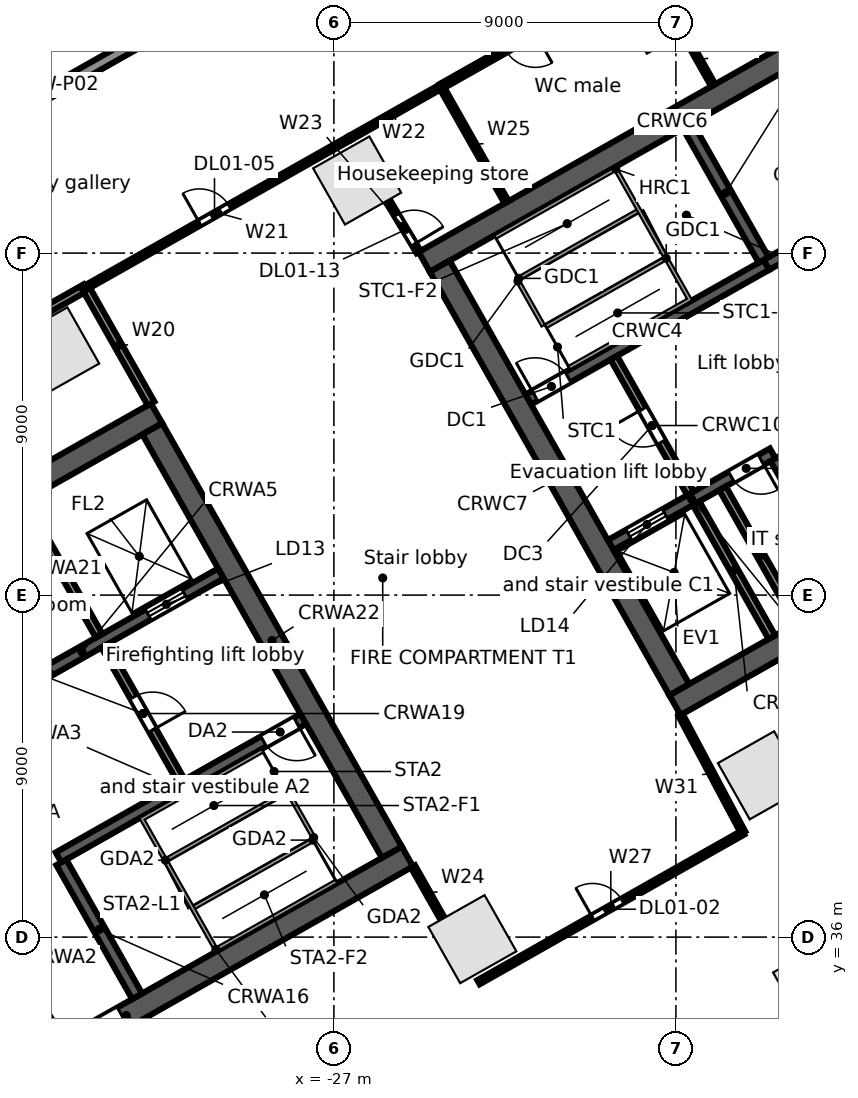
"""IFC4 building model, lengths in metres.
Left out: names, types, materials, properties, quantities, classifications, styles, units other than length and angle.
Written with IfcOpenShell. Run it as: python <this file> out.ifc"""

import sys

from ifc_helpers import new_model, si_unit, direction, frame, frame_2d, origin, origin_2d, place, context, subcontext, project, spatial, rectangle, extrude, element, fill, save


model = new_model("IFC4")
c1 = context("Model", 3, precision=1e-05, world=origin(), true_north=direction((0.0, 1.0)))
c2 = subcontext(c1, "Body", "Model", "MODEL_VIEW")
j1 = project(units=[si_unit("LENGTHUNIT", "METRE"), si_unit("PLANEANGLEUNIT", "RADIAN")], contexts=[c1])
p1 = place(None, origin())
s1 = spatial("IfcSite", under=j1, at=p1, CompositionType="ELEMENT")
p2 = place(p1, origin())
s2 = spatial("IfcBuilding", under=s1, at=p2, CompositionType="ELEMENT")
p3 = place(p2, frame((0.0, 0.0, 6.5)))
s3 = spatial("IfcBuildingStorey", under=s2, at=p3, CompositionType="ELEMENT", Elevation=6.5)
for number, where, z_axis, x_axis in (
    (1, (-18.441, 60.406, 0.0), (0.0, 0.0, 1.0), (-0.87, -0.492, 0.0)),
    (2, (-26.388, 55.91, 0.0), (0.0, 0.0, 1.0), (-0.87, -0.492, 0.0)),
    (3, (-34.334, 51.414, 0.0), (0.0, 0.0, 1.0), (-0.87, -0.492, 0.0)),
    (4, (-23.356, 35.946, 0.0), (0.0, 0.0, 1.0), (0.87, 0.492, 0.0)),
    (5, (-15.736, 40.257, 0.0), (0.0, 0.0, 1.0), (0.87, 0.492, 0.0)),
):
    element("IfcColumn", number, at=place(p3, frame(where, z_axis=z_axis, x_axis=x_axis)), inside=s3, PredefinedType="COLUMN", context=c2, shape_type="SweptSolid", body=[
        extrude(rectangle(XDim=1.7, YDim=1.7, at=origin_2d()), origin(), (0.0, 0.0, 1.0), 5.0),
    ])
p4 = place(p3, frame((-14.761, 34.88, 0.0), z_axis=(0.0, 0.0, 1.0), x_axis=(0.87035569594, 0.492423560103, 0.0)))
e6 = element("IfcColumn", 6, at=p4, inside=s3, PredefinedType="COLUMN", context=c2, shape_type="SweptSolid", body=[
    extrude(rectangle(XDim=1.0, YDim=1.0, at=origin_2d()), origin(), (0.0, 0.0, 1.0), 5.0),
])
p5 = place(p3, frame((-63.707, 41.701, 0.0), z_axis=(0.0, 0.0, 1.0), x_axis=(0.870355510268, 0.492423888277, 0.0)))
e7 = element("IfcWall", 7, at=p5, inside=s3, PredefinedType="STANDARD", context=c2, shape_type="SweptSolid", body=[
    extrude(rectangle(XDim=67.903, YDim=0.3, at=frame_2d((33.952, 0.0))), origin(), (0.0, 0.0, 1.0), 4.65),
])
p6 = place(p3, frame((-39.862, 29.749, 0.0), z_axis=(0.0, 0.0, 1.0), x_axis=(0.870350116061, 0.492433422375, 0.0)))
e8 = element("IfcWall", 8, at=p6, inside=s3, PredefinedType="SOLIDWALL", context=c2, shape_type="SweptSolid", body=[
    extrude(rectangle(XDim=17.0, YDim=0.6, at=frame_2d((8.5, 0.0))), origin(), (0.0, 0.0, 1.0), 4.65),
])
p7 = place(p6, frame((7.2, 0.0, 0.0)))
e9 = element("IfcOpeningElement", 9, at=p7, cuts=e8, PredefinedType="OPENING", context=c2, shape_type="SweptSolid", body=[
    extrude(rectangle(XDim=1.2, YDim=2.1, at=frame_2d((0.6, 1.05))), frame((0.0, 0.31, 0.0), z_axis=(0.0, -1.0, 0.0), x_axis=(1.0, 0.0, 0.0)), (0.0, 0.0, 1.0), 0.62),
])
p8 = place(p3, frame((-34.245, 38.097, 0.0), z_axis=(0.0, 0.0, 1.0), x_axis=(0.870364910201, 0.492407273597, 0.0)))
e10 = element("IfcWall", 10, at=p8, inside=s3, PredefinedType="SOLIDWALL", context=c2, shape_type="SweptSolid", body=[
    extrude(rectangle(XDim=7.4, YDim=0.3, at=frame_2d((3.7, 0.0))), origin(), (0.0, 0.0, 1.0), 4.65),
])
p9 = place(p8, frame((6.2, 0.0, 0.0)))
e11 = element("IfcOpeningElement", 11, at=p9, cuts=e10, PredefinedType="OPENING", context=c2, shape_type="SweptSolid", body=[
    extrude(rectangle(XDim=1.0, YDim=2.1, at=frame_2d((0.5, 1.05))), frame((0.0, 0.16, 0.0), z_axis=(0.0, -1.0, 0.0), x_axis=(1.0, 0.0, 0.0)), (0.0, 0.0, 1.0), 0.32),
])
p10 = place(p3, frame((-37.282, 41.435, 0.0), z_axis=(0.0, 0.0, 1.0), x_axis=(0.870356516133, 0.492422110414, 0.0)))
e12 = element("IfcWall", 12, at=p10, inside=s3, PredefinedType="SOLIDWALL", context=c2, shape_type="SweptSolid", body=[
    extrude(rectangle(XDim=8.4, YDim=0.3, at=frame_2d((4.2, 0.0))), origin(), (0.0, 0.0, 1.0), 4.65),
])
p11 = place(p10, frame((6.2, 0.0, 0.0)))
e13 = element("IfcOpeningElement", 13, at=p11, cuts=e12, PredefinedType="OPENING", context=c2, shape_type="SweptSolid", body=[
    extrude(rectangle(XDim=1.1, YDim=2.1, at=frame_2d((0.55, 1.05))), frame((0.0, 0.16, 0.0), z_axis=(0.0, -1.0, 0.0), x_axis=(1.0, 0.0, 0.0)), (0.0, 0.0, 1.0), 0.32),
])
p12 = place(p10, frame((2.35, 0.0, 0.0)))
e14 = element("IfcOpeningElement", 14, at=p12, cuts=e12, PredefinedType="OPENING", context=c2, shape_type="SweptSolid", body=[
    extrude(rectangle(XDim=0.9, YDim=2.1, at=frame_2d((0.45, 1.05))), frame((0.0, 0.16, 0.0), z_axis=(0.0, -1.0, 0.0), x_axis=(1.0, 0.0, 0.0)), (0.0, 0.0, 1.0), 0.32),
])
p13 = place(p3, frame((-46.461, 41.412, 0.0), z_axis=(0.0, 0.0, 1.0), x_axis=(0.870350116061, 0.492433422375, 0.0)))
e15 = element("IfcWall", 15, at=p13, inside=s3, PredefinedType="SOLIDWALL", context=c2, shape_type="SweptSolid", body=[
    extrude(rectangle(XDim=17.0, YDim=0.6, at=frame_2d((8.5, 0.0))), origin(), (0.0, 0.0, 1.0), 4.65),
])
p14 = place(p3, frame((-36.26, 36.785, 0.0), z_axis=(0.0, 0.0, 1.0), x_axis=(0.492440575896, -0.870346068648, 0.0)))
e16 = element("IfcWall", 16, at=p14, inside=s3, PredefinedType="SOLIDWALL", context=c2, shape_type="SweptSolid", body=[
    extrude(rectangle(XDim=4.05, YDim=0.3, at=frame_2d((2.025, 0.0))), origin(), (0.0, 0.0, 1.0), 4.65),
])
p15 = place(p3, frame((-34.171, 37.967, 0.0), z_axis=(0.0, 0.0, 1.0), x_axis=(0.492394910396, -0.870371904542, 0.0)))
e17 = element("IfcWall", 17, at=p15, inside=s3, PredefinedType="SOLIDWALL", context=c2, shape_type="SweptSolid", body=[
    extrude(rectangle(XDim=4.05, YDim=0.3, at=frame_2d((2.025, 0.0))), origin(), (0.0, 0.0, 1.0), 4.65),
])
p16 = place(p3, frame((-33.031, 43.667, 0.0), z_axis=(0.0, 0.0, 1.0), x_axis=(0.492408451753, -0.87036424366, 0.0)))
e18 = element("IfcWall", 18, at=p16, inside=s3, PredefinedType="PARTITIONING", context=c2, shape_type="SweptSolid", body=[
    extrude(rectangle(XDim=4.1, YDim=0.2, at=frame_2d((2.05, 0.0))), origin(), (0.0, 0.0, 1.0), 4.65),
])
p17 = place(p16, frame((1.55, 0.0, 0.0)))
e19 = element("IfcOpeningElement", 19, at=p17, cuts=e18, PredefinedType="OPENING", context=c2, shape_type="SweptSolid", body=[
    extrude(rectangle(XDim=1.0, YDim=2.1, at=frame_2d((0.5, 1.05))), frame((0.0, 0.11, 0.0), z_axis=(0.0, -1.0, 0.0), x_axis=(1.0, 0.0, 0.0)), (0.0, 0.0, 1.0), 0.22),
])
p18 = place(p3, frame((-35.173, 47.454, 0.0), z_axis=(0.0, 0.0, 1.0), x_axis=(0.492440575896, -0.870346068648, 0.0)))
e20 = element("IfcWall", 20, at=p18, inside=s3, PredefinedType="SOLIDWALL", context=c2, shape_type="SweptSolid", body=[
    extrude(rectangle(XDim=4.05, YDim=0.2, at=frame_2d((2.025, 0.0))), origin(), (0.0, 0.0, 1.0), 4.65),
])
p19 = place(p3, frame((-31.778, 49.374, 0.0), z_axis=(0.0, 0.0, 1.0), x_axis=(0.492433046652, -0.870350328641, 0.0)))
e21 = element("IfcWall", 21, at=p19, inside=s3, PredefinedType="SOLIDWALL", context=c2, shape_type="SweptSolid", body=[
    extrude(rectangle(XDim=12.8, YDim=0.6, at=frame_2d((6.4, 0.0))), origin(), (0.0, 0.0, 1.0), 4.65),
])
p20 = place(p3, frame((-18.024, 42.104, 0.0), z_axis=(0.0, 0.0, 1.0), x_axis=(0.870360574057, 0.492414937962, 0.0)))
e22 = element("IfcWall", 22, at=p20, inside=s3, PredefinedType="SOLIDWALL", context=c2, shape_type="SweptSolid", body=[
    extrude(rectangle(XDim=15.0, YDim=0.6, at=frame_2d((7.5, 0.0))), origin(), (0.0, 0.0, 1.0), 4.65),
])
p21 = place(p20, frame((6.1, 0.0, 0.0)))
e23 = element("IfcOpeningElement", 23, at=p21, cuts=e22, PredefinedType="OPENING", context=c2, shape_type="SweptSolid", body=[
    extrude(rectangle(XDim=1.2, YDim=2.1, at=frame_2d((0.6, 1.05))), frame((0.0, 0.31, 0.0), z_axis=(0.0, -1.0, 0.0), x_axis=(1.0, 0.0, 0.0)), (0.0, 0.0, 1.0), 0.62),
])
p22 = place(p3, frame((-19.718, 46.316, 0.0), z_axis=(0.0, 0.0, 1.0), x_axis=(0.870353963862, 0.492426621528, 0.0)))
e24 = element("IfcWall", 24, at=p22, inside=s3, PredefinedType="SOLIDWALL", context=c2, shape_type="SweptSolid", body=[
    extrude(rectangle(XDim=4.9, YDim=0.3, at=frame_2d((2.45, 0.0))), origin(), (0.0, 0.0, 1.0), 4.65),
])
p23 = place(p22, frame((0.55, 0.0, 0.0)))
e25 = element("IfcOpeningElement", 25, at=p23, cuts=e24, PredefinedType="OPENING", context=c2, shape_type="SweptSolid", body=[
    extrude(rectangle(XDim=1.1, YDim=2.1, at=frame_2d((0.55, 1.05))), frame((0.0, 0.16, 0.0), z_axis=(0.0, -1.0, 0.0), x_axis=(1.0, 0.0, 0.0)), (0.0, 0.0, 1.0), 0.32),
])
p24 = place(p22, frame((3.65, 0.0, 0.0)))
e26 = element("IfcOpeningElement", 26, at=p24, cuts=e24, PredefinedType="OPENING", context=c2, shape_type="SweptSolid", body=[
    extrude(rectangle(XDim=0.9, YDim=2.1, at=frame_2d((0.45, 1.05))), frame((0.0, 0.16, 0.0), z_axis=(0.0, -1.0, 0.0), x_axis=(1.0, 0.0, 0.0)), (0.0, 0.0, 1.0), 0.32),
])
p25 = place(p3, frame((-21.885, 50.146, 0.0), z_axis=(0.0, 0.0, 1.0), x_axis=(0.870359411463, 0.492416992881, 0.0)))
e27 = element("IfcWall", 27, at=p25, inside=s3, PredefinedType="SOLIDWALL", context=c2, shape_type="SweptSolid", body=[
    extrude(rectangle(XDim=7.2, YDim=0.3, at=frame_2d((3.6, 0.0))), origin(), (0.0, 0.0, 1.0), 4.65),
])
p26 = place(p25, frame((0.2, 0.0, 0.0)))
e28 = element("IfcOpeningElement", 28, at=p26, cuts=e27, PredefinedType="OPENING", context=c2, shape_type="SweptSolid", body=[
    extrude(rectangle(XDim=1.0, YDim=2.1, at=frame_2d((0.5, 1.05))), frame((0.0, 0.16, 0.0), z_axis=(0.0, -1.0, 0.0), x_axis=(1.0, 0.0, 0.0)), (0.0, 0.0, 1.0), 0.32),
])
p27 = place(p3, frame((-15.618, 53.691, 0.0), z_axis=(0.0, 0.0, 1.0), x_axis=(0.870356769198, 0.492421663121, 0.0)))
e29 = element("IfcWall", 29, at=p27, inside=s3, PredefinedType="SOLIDWALL", context=c2, shape_type="SweptSolid", body=[
    extrude(rectangle(XDim=6.6, YDim=0.3, at=frame_2d((3.3, 0.0))), origin(), (0.0, 0.0, 1.0), 4.65),
])
p28 = place(p27, frame((3.0, 0.0, 0.0)))
e30 = element("IfcOpeningElement", 30, at=p28, cuts=e29, PredefinedType="OPENING", context=c2, shape_type="SweptSolid", body=[
    extrude(rectangle(XDim=0.9, YDim=2.1, at=frame_2d((0.45, 1.05))), frame((0.0, 0.16, 0.0), z_axis=(0.0, -1.0, 0.0), x_axis=(1.0, 0.0, 0.0)), (0.0, 0.0, 1.0), 0.32),
])
p29 = place(p3, frame((-24.623, 53.767, 0.0), z_axis=(0.0, 0.0, 1.0), x_axis=(0.870356627484, 0.492421913601, 0.0)))
e31 = element("IfcWall", 31, at=p29, inside=s3, PredefinedType="SOLIDWALL", context=c2, shape_type="SweptSolid", body=[
    extrude(rectangle(XDim=15.0, YDim=0.6, at=frame_2d((7.5, 0.0))), origin(), (0.0, 0.0, 1.0), 4.65),
])
p30 = place(p3, frame((-24.214, 53.654, 0.0), z_axis=(0.0, 0.0, 1.0), x_axis=(0.492441221355, -0.870345703448, 0.0)))
e32 = element("IfcWall", 32, at=p30, inside=s3, PredefinedType="SOLIDWALL", context=c2, shape_type="SweptSolid", body=[
    extrude(rectangle(XDim=12.8, YDim=0.6, at=frame_2d((6.4, 0.0))), origin(), (0.0, 0.0, 1.0), 4.65),
])
p31 = place(p3, frame((-17.469, 47.417, 0.0), z_axis=(0.0, 0.0, 1.0), x_axis=(0.492440575896, -0.870346068648, 0.0)))
e33 = element("IfcWall", 33, at=p31, inside=s3, PredefinedType="SOLIDWALL", context=c2, shape_type="SweptSolid", body=[
    extrude(rectangle(XDim=4.05, YDim=0.2, at=frame_2d((2.025, 0.0))), origin(), (0.0, 0.0, 1.0), 4.65),
])
p32 = place(p3, frame((-19.635, 51.246, 0.0), z_axis=(0.0, 0.0, 1.0), x_axis=(0.492408451753, -0.87036424366, 0.0)))
e34 = element("IfcWall", 34, at=p32, inside=s3, PredefinedType="PARTITIONING", context=c2, shape_type="SweptSolid", body=[
    extrude(rectangle(XDim=4.1, YDim=0.2, at=frame_2d((2.05, 0.0))), origin(), (0.0, 0.0, 1.0), 4.65),
])
p33 = place(p32, frame((1.55, 0.0, 0.0)))
e35 = element("IfcOpeningElement", 35, at=p33, cuts=e34, PredefinedType="OPENING", context=c2, shape_type="SweptSolid", body=[
    extrude(rectangle(XDim=1.0, YDim=2.1, at=frame_2d((0.5, 1.05))), frame((0.0, 0.11, 0.0), z_axis=(0.0, -1.0, 0.0), x_axis=(1.0, 0.0, 0.0)), (0.0, 0.0, 1.0), 0.22),
])
p34 = place(p3, frame((-16.772, 47.811, 0.0), z_axis=(0.0, 0.0, 1.0), x_axis=(0.492440575896, -0.870346068648, 0.0)))
e36 = element("IfcWall", 36, at=p34, inside=s3, PredefinedType="SOLIDWALL", context=c2, shape_type="SweptSolid", body=[
    extrude(rectangle(XDim=4.05, YDim=0.2, at=frame_2d((2.025, 0.0))), origin(), (0.0, 0.0, 1.0), 4.65),
])
p35 = place(p3, frame((-15.379, 48.599, 0.0), z_axis=(0.0, 0.0, 1.0), x_axis=(0.492394910396, -0.870371904542, 0.0)))
e37 = element("IfcWall", 37, at=p35, inside=s3, PredefinedType="SOLIDWALL", context=c2, shape_type="SweptSolid", body=[
    extrude(rectangle(XDim=4.05, YDim=0.3, at=frame_2d((2.025, 0.0))), origin(), (0.0, 0.0, 1.0), 4.65),
])
p36 = place(p3, frame((-17.686, 57.347, 0.0), z_axis=(0.0, 0.0, 1.0), x_axis=(0.492420746998, -0.870357287513, 0.0)))
e38 = element("IfcWall", 38, at=p36, inside=s3, PredefinedType="SOLIDWALL", context=c2, shape_type="SweptSolid", body=[
    extrude(rectangle(XDim=4.05, YDim=0.3, at=frame_2d((2.025, 0.0))), origin(), (0.0, 0.0, 1.0), 4.65),
])
p37 = place(p3, frame((-40.934, 48.905, 0.0), z_axis=(0.0, 0.0, 1.0), x_axis=(0.870387854278, 0.492366716102, 0.0)))
e39 = element("IfcWall", 39, at=p37, inside=s3, PredefinedType="PARTITIONING", context=c2, shape_type="SweptSolid", body=[
    extrude(rectangle(XDim=8.5, YDim=0.2, at=frame_2d((4.25, 0.0))), origin(), (0.0, 0.0, 1.0), 4.03),
])
p38 = place(p3, frame((-33.536, 53.09, 0.0), z_axis=(0.0, 0.0, 1.0), x_axis=(0.492521469645, -0.870300294116, 0.0)))
e40 = element("IfcWall", 40, at=p38, inside=s3, PredefinedType="PARTITIONING", context=c2, shape_type="SweptSolid", body=[
    extrude(rectangle(XDim=3.5, YDim=0.2, at=frame_2d((1.75, 0.0))), origin(), (0.0, 0.0, 1.0), 3.93),
])
p39 = place(p3, frame((-33.536, 53.09, 0.0), z_axis=(0.0, 0.0, 1.0), x_axis=(0.870327439455, 0.492473499928, 0.0)))
e41 = element("IfcWall", 41, at=p39, inside=s3, PredefinedType="PARTITIONING", context=c2, shape_type="SweptSolid", body=[
    extrude(rectangle(XDim=8.0, YDim=0.125, at=frame_2d((4.0, 0.0))), origin(), (0.0, 0.0, 1.0), 3.712),
])
p40 = place(p39, frame((3.45, 0.0, 0.0)))
e42 = element("IfcOpeningElement", 42, at=p40, cuts=e41, PredefinedType="OPENING", context=c2, shape_type="SweptSolid", body=[
    extrude(rectangle(XDim=0.9, YDim=2.1, at=frame_2d((0.45, 1.05))), frame((0.0, 0.073, 0.0), z_axis=(0.0, -1.0, 0.0), x_axis=(1.0, 0.0, 0.0)), (0.0, 0.0, 1.0), 0.145),
])
p41 = place(p3, frame((-26.573, 57.03, 0.0), z_axis=(0.0, 0.0, 1.0), x_axis=(0.870344460795, 0.492443417626, 0.0)))
e43 = element("IfcWall", 43, at=p41, inside=s3, PredefinedType="PARTITIONING", context=c2, shape_type="SweptSolid", body=[
    extrude(rectangle(XDim=2.75, YDim=0.125, at=frame_2d((1.375, 0.0))), origin(), (0.0, 0.0, 1.0), 4.65),
])
p42 = place(p3, frame((-25.587, 55.387, 0.0), z_axis=(0.0, 0.0, 1.0), x_axis=(0.514767546849, -0.857329792268, 0.0)))
e44 = element("IfcWall", 44, at=p42, inside=s3, PredefinedType="PARTITIONING", context=c2, shape_type="SweptSolid", body=[
    extrude(rectangle(XDim=1.585, YDim=0.125, at=frame_2d((0.792, 0.0))), origin(), (0.0, 0.0, 1.0), 4.65),
])
p43 = place(p42, frame((0.45, 0.0, 0.0)))
e45 = element("IfcOpeningElement", 45, at=p43, cuts=e44, PredefinedType="OPENING", context=c2, shape_type="SweptSolid", body=[
    extrude(rectangle(XDim=0.9, YDim=2.1, at=frame_2d((0.45, 1.05))), frame((0.0, 0.073, 0.0), z_axis=(0.0, -1.0, 0.0), x_axis=(1.0, 0.0, 0.0)), (0.0, 0.0, 1.0), 0.145),
])
p44 = place(p3, frame((-24.919, 37.859, 0.0), z_axis=(0.0, 0.0, 1.0), x_axis=(0.492366981934, -0.870387703901, 0.0)))
e46 = element("IfcWall", 46, at=p44, inside=s3, PredefinedType="PARTITIONING", context=c2, shape_type="SweptSolid", body=[
    extrude(rectangle(XDim=1.584, YDim=0.125, at=frame_2d((0.792, 0.0))), origin(), (0.0, 0.0, 1.0), 4.65),
])
p45 = place(p3, frame((-24.18, 58.384, 0.0), z_axis=(0.0, 0.0, 1.0), x_axis=(0.492521469645, -0.870300294116, 0.0)))
e47 = element("IfcWall", 47, at=p45, inside=s3, PredefinedType="PARTITIONING", context=c2, shape_type="SweptSolid", body=[
    extrude(rectangle(XDim=3.5, YDim=0.125, at=frame_2d((1.75, 0.0))), origin(), (0.0, 0.0, 1.0), 3.93),
])
p46 = place(p3, frame((-24.18, 58.384, 0.0), z_axis=(0.0, 0.0, 1.0), x_axis=(0.870360772617, 0.492414587, 0.0)))
e48 = element("IfcWall", 48, at=p46, inside=s3, PredefinedType="PARTITIONING", context=c2, shape_type="SweptSolid", body=[
    extrude(rectangle(XDim=4.75, YDim=0.15, at=frame_2d((2.375, 0.0))), origin(), (0.0, 0.0, 1.0), 4.65),
])
p47 = place(p46, frame((1.95, 0.0, 0.0)))
e49 = element("IfcOpeningElement", 49, at=p47, cuts=e48, PredefinedType="OPENING", context=c2, shape_type="SweptSolid", body=[
    extrude(rectangle(XDim=0.9, YDim=2.1, at=frame_2d((0.45, 1.05))), frame((0.0, 0.085, 0.0), z_axis=(0.0, -1.0, 0.0), x_axis=(1.0, 0.0, 0.0)), (0.0, 0.0, 1.0), 0.17),
])
p48 = place(p3, frame((-23.195, 34.813, 0.0), z_axis=(0.0, 0.0, 1.0), x_axis=(0.870387155114, 0.492367952057, 0.0)))
e50 = element("IfcWall", 50, at=p48, inside=s3, PredefinedType="PARTITIONING", context=c2, shape_type="SweptSolid", body=[
    extrude(rectangle(XDim=8.0, YDim=0.125, at=frame_2d((4.0, 0.0))), origin(), (0.0, 0.0, 1.0), 4.03),
])
p49 = place(p48, frame((3.45, 0.0, 0.0)))
e51 = element("IfcOpeningElement", 51, at=p49, cuts=e50, PredefinedType="OPENING", context=c2, shape_type="SweptSolid", body=[
    extrude(rectangle(XDim=0.9, YDim=2.1, at=frame_2d((0.45, 1.05))), frame((0.0, 0.073, 0.0), z_axis=(0.0, -1.0, 0.0), x_axis=(1.0, 0.0, 0.0)), (0.0, 0.0, 1.0), 0.145),
])
p50 = place(p3, frame((-17.877, 41.843, 0.0), z_axis=(0.0, 0.0, 1.0), x_axis=(0.469799130562, -0.882773344026, 0.0)))
e52 = element("IfcWall", 52, at=p50, inside=s3, PredefinedType="PARTITIONING", context=c2, shape_type="SweptSolid", body=[
    extrude(rectangle(XDim=3.501, YDim=0.125, at=frame_2d((1.751, 0.0))), origin(), (0.0, 0.0, 1.0), 3.93),
])
p51 = place(p3, frame((-17.797, 59.794, 0.0), z_axis=(0.0, 0.0, 1.0), x_axis=(0.492366981934, -0.870387703901, 0.0)))
e53 = element("IfcWall", 53, at=p51, inside=s3, PredefinedType="PARTITIONING", context=c2, shape_type="SweptSolid", body=[
    extrude(rectangle(XDim=1.584, YDim=0.125, at=frame_2d((0.792, 0.0))), origin(), (0.0, 0.0, 1.0), 4.65),
])
p52 = place(p11, origin())
e54 = element("IfcDoor", 54, at=p52, inside=s3, OperationType="DOUBLE_DOOR_SLIDING", PredefinedType="DOOR", context=c2, shape_type="SweptSolid", body=[
    extrude(rectangle(XDim=1.1, YDim=2.1, at=frame_2d((0.55, 1.05))), frame((0.0, 0.025, 0.0), z_axis=(0.0, -1.0, 0.0), x_axis=(1.0, 0.0, 0.0)), (0.0, 0.0, 1.0), 0.05),
])
fill(e13, e54)
p53 = place(p9, frame((1.0, 0.0, 0.0), z_axis=(0.0, 0.0, 1.0), x_axis=(-1.0, 0.0, 0.0)))
e55 = element("IfcDoor", 55, at=p53, inside=s3, OperationType="SINGLE_SWING_LEFT", PredefinedType="DOOR", context=c2, shape_type="SweptSolid", body=[
    extrude(rectangle(XDim=1.0, YDim=2.1, at=frame_2d((0.5, 1.05))), frame((0.0, 0.025, 0.0), z_axis=(0.0, -1.0, 0.0), x_axis=(1.0, 0.0, 0.0)), (0.0, 0.0, 1.0), 0.05),
])
fill(e11, e55)
p54 = place(p17, origin())
e56 = element("IfcDoor", 56, at=p54, inside=s3, OperationType="SINGLE_SWING_RIGHT", PredefinedType="DOOR", context=c2, shape_type="SweptSolid", body=[
    extrude(rectangle(XDim=1.0, YDim=2.1, at=frame_2d((0.5, 1.05))), frame((0.0, 0.025, 0.0), z_axis=(0.0, -1.0, 0.0), x_axis=(1.0, 0.0, 0.0)), (0.0, 0.0, 1.0), 0.05),
])
fill(e19, e56)
p55 = place(p7, frame((1.2, 0.0, 0.0), z_axis=(0.0, 0.0, 1.0), x_axis=(-1.0, 0.0, 0.0)))
e57 = element("IfcDoor", 57, at=p55, inside=s3, OperationType="SINGLE_SWING_RIGHT", PredefinedType="DOOR", context=c2, shape_type="SweptSolid", body=[
    extrude(rectangle(XDim=1.2, YDim=2.1, at=frame_2d((0.6, 1.05))), frame((0.0, 0.025, 0.0), z_axis=(0.0, -1.0, 0.0), x_axis=(1.0, 0.0, 0.0)), (0.0, 0.0, 1.0), 0.05),
])
fill(e9, e57)
p56 = place(p23, origin())
e58 = element("IfcDoor", 58, at=p56, inside=s3, OperationType="DOUBLE_DOOR_SLIDING", PredefinedType="DOOR", context=c2, shape_type="SweptSolid", body=[
    extrude(rectangle(XDim=1.1, YDim=2.1, at=frame_2d((0.55, 1.05))), frame((0.0, 0.025, 0.0), z_axis=(0.0, -1.0, 0.0), x_axis=(1.0, 0.0, 0.0)), (0.0, 0.0, 1.0), 0.05),
])
fill(e25, e58)
p57 = place(p26, origin())
e59 = element("IfcDoor", 59, at=p57, inside=s3, OperationType="SINGLE_SWING_LEFT", PredefinedType="DOOR", context=c2, shape_type="SweptSolid", body=[
    extrude(rectangle(XDim=1.0, YDim=2.1, at=frame_2d((0.5, 1.05))), frame((0.0, 0.025, 0.0), z_axis=(0.0, -1.0, 0.0), x_axis=(1.0, 0.0, 0.0)), (0.0, 0.0, 1.0), 0.05),
])
fill(e28, e59)
p58 = place(p33, frame((1.0, 0.0, 0.0), z_axis=(0.0, 0.0, 1.0), x_axis=(-1.0, 0.0, 0.0)))
e60 = element("IfcDoor", 60, at=p58, inside=s3, OperationType="SINGLE_SWING_RIGHT", PredefinedType="DOOR", context=c2, shape_type="SweptSolid", body=[
    extrude(rectangle(XDim=1.0, YDim=2.1, at=frame_2d((0.5, 1.05))), frame((0.0, 0.025, 0.0), z_axis=(0.0, -1.0, 0.0), x_axis=(1.0, 0.0, 0.0)), (0.0, 0.0, 1.0), 0.05),
])
fill(e35, e60)
p59 = place(p24, frame((0.9, 0.0, 0.0), z_axis=(0.0, 0.0, 1.0), x_axis=(-1.0, 0.0, 0.0)))
e61 = element("IfcDoor", 61, at=p59, inside=s3, OperationType="SINGLE_SWING_LEFT", PredefinedType="DOOR", context=c2, shape_type="SweptSolid", body=[
    extrude(rectangle(XDim=0.9, YDim=2.1, at=frame_2d((0.45, 1.05))), frame((0.0, 0.025, 0.0), z_axis=(0.0, -1.0, 0.0), x_axis=(1.0, 0.0, 0.0)), (0.0, 0.0, 1.0), 0.05),
])
fill(e26, e61)
p60 = place(p49, origin())
e62 = element("IfcDoor", 62, at=p60, inside=s3, OperationType="SINGLE_SWING_LEFT", PredefinedType="DOOR", context=c2, shape_type="SweptSolid", body=[
    extrude(rectangle(XDim=0.9, YDim=2.1, at=frame_2d((0.45, 1.05))), frame((0.0, 0.025, 0.0), z_axis=(0.0, -1.0, 0.0), x_axis=(1.0, 0.0, 0.0)), (0.0, 0.0, 1.0), 0.05),
])
fill(e51, e62)
p61 = place(p40, origin())
e63 = element("IfcDoor", 63, at=p61, inside=s3, OperationType="SINGLE_SWING_LEFT", PredefinedType="DOOR", context=c2, shape_type="SweptSolid", body=[
    extrude(rectangle(XDim=0.9, YDim=2.1, at=frame_2d((0.45, 1.05))), frame((0.0, 0.025, 0.0), z_axis=(0.0, -1.0, 0.0), x_axis=(1.0, 0.0, 0.0)), (0.0, 0.0, 1.0), 0.05),
])
fill(e42, e63)
p62 = place(p43, origin())
e64 = element("IfcDoor", 64, at=p62, inside=s3, OperationType="SINGLE_SWING_RIGHT", PredefinedType="DOOR", context=c2, shape_type="SweptSolid", body=[
    extrude(rectangle(XDim=0.9, YDim=2.1, at=frame_2d((0.45, 1.05))), frame((0.0, 0.025, 0.0), z_axis=(0.0, -1.0, 0.0), x_axis=(1.0, 0.0, 0.0)), (0.0, 0.0, 1.0), 0.05),
])
fill(e45, e64)
save(model, sys.argv[1])
